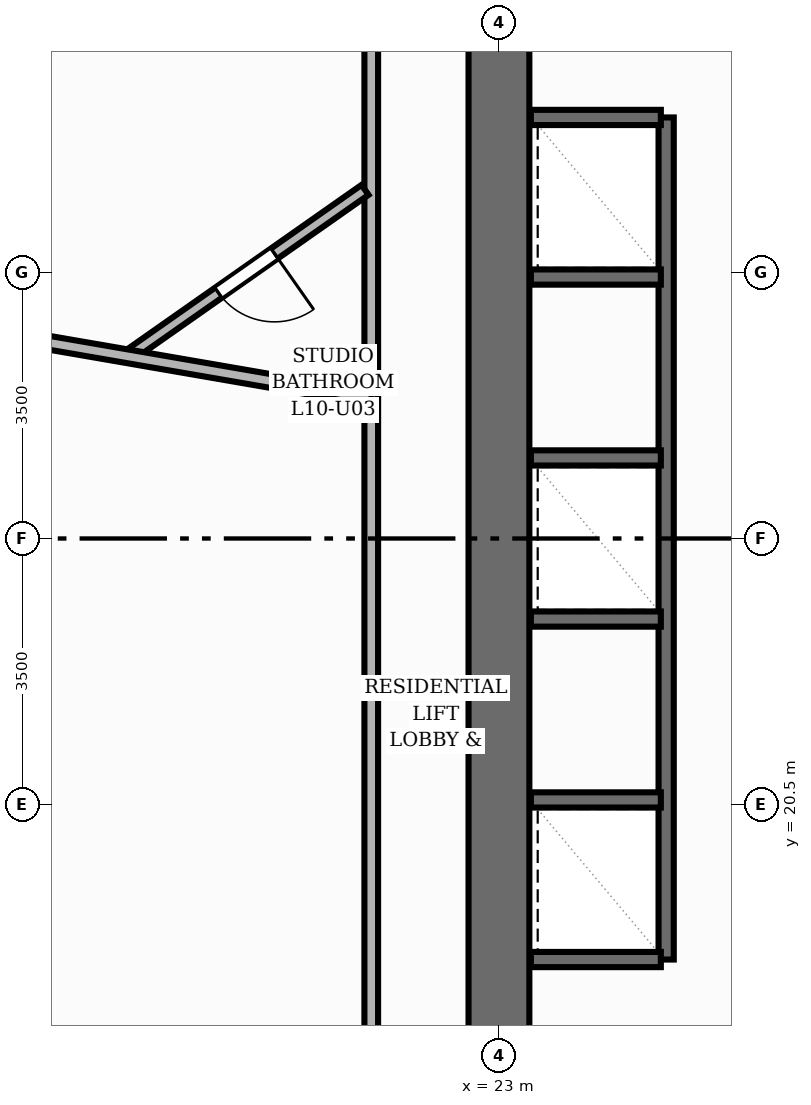
"""IFC4 building model, lengths in metres.
Left out: names, types, materials, properties, quantities, classifications, styles, units other than length and angle.
Written with IfcOpenShell. Run it as: python <this file> out.ifc"""

import sys

from ifc_helpers import new_model, si_unit, direction, frame, frame_2d, origin, place, context, subcontext, project, spatial, rectangle, extrude, element, fill, save


model = new_model("IFC4")
c1 = context("Model", 3, precision=1e-05, world=origin(), true_north=direction((0.0, 1.0)))
c2 = subcontext(c1, "Body", "Model", "MODEL_VIEW")
j1 = project(units=[si_unit("LENGTHUNIT", "METRE"), si_unit("PLANEANGLEUNIT", "RADIAN")], contexts=[c1])
p1 = place(None, origin())
s1 = spatial("IfcSite", under=j1, at=p1, CompositionType="ELEMENT")
p2 = place(p1, origin())
s2 = spatial("IfcBuilding", under=s1, at=p2, CompositionType="ELEMENT")
p3 = place(p2, frame((0.0, 0.0, 37.6)))
s3 = spatial("IfcBuildingStorey", under=s2, at=p3, CompositionType="ELEMENT", Elevation=37.6)
p4 = place(p3, frame((23.0, 17.4, 0.0), z_axis=(0.0, 0.0, 1.0), x_axis=(0.0, 1.0, 0.0)))
e1 = element("IfcWall", 1, at=p4, inside=s3, PredefinedType="SHEAR", context=c2, shape_type="SweptSolid", body=[
    extrude(rectangle(XDim=13.2, YDim=0.8, at=frame_2d((6.6, 0.0))), origin(), (0.0, 0.0, 1.0), 3.2),
])
p5 = place(p3, frame((25.2, 18.46, 0.0), z_axis=(0.0, 0.0, 1.0), x_axis=(0.0, 1.0, 0.0)))
e2 = element("IfcWall", 2, at=p5, inside=s3, PredefinedType="SHEAR", context=c2, shape_type="SweptSolid", body=[
    extrude(rectangle(XDim=11.08, YDim=0.2, at=frame_2d((5.54, 0.0))), origin(), (0.0, 0.0, 1.0), 3.2),
])
for number, where, z_axis, x_axis in (
    (3, (23.42, 18.46, 0.0), (0.0, 0.0, 1.0), (1.0, 0.0, 0.0)),
    (4, (23.42, 29.54, 0.0), (0.0, 0.0, 1.0), (1.0, 0.0, 0.0)),
    (5, (23.42, 20.56, 0.0), (0.0, 0.0, 1.0), (1.0, 0.0, 0.0)),
    (6, (23.42, 22.94, 0.0), (0.0, 0.0, 1.0), (1.0, 0.0, 0.0)),
    (7, (23.42, 25.06, 0.0), (0.0, 0.0, 1.0), (1.0, 0.0, 0.0)),
    (8, (23.42, 27.44, 0.0), (0.0, 0.0, 1.0), (1.0, 0.0, 0.0)),
):
    element("IfcWall", number, at=place(p3, frame(where, z_axis=z_axis, x_axis=x_axis)), inside=s3, PredefinedType="SHEAR", context=c2, shape_type="SweptSolid", body=[
        extrude(rectangle(XDim=1.71, YDim=0.2, at=frame_2d((0.855, 0.0))), origin(), (0.0, 0.0, 1.0), 3.2),
    ])
p6 = place(p3, frame((21.32, 15.32, 0.0), z_axis=(0.0, 0.0, 1.0), x_axis=(0.0, 1.0, 0.0)))
e9 = element("IfcWall", 9, at=p6, inside=s3, PredefinedType="PARTITIONING", context=c2, shape_type="SweptSolid", body=[
    extrude(rectangle(XDim=17.36, YDim=0.18, at=frame_2d((8.68, 0.0))), origin(), (0.0, 0.0, 1.0), 2.955),
])
p7 = place(p3, frame((21.238, 28.587, 0.0), z_axis=(0.0, 0.0, 1.0), x_axis=(-0.818554579869, -0.57442875953, 0.0)))
e10 = element("IfcWall", 10, at=p7, inside=s3, PredefinedType="PLUMBINGWALL", context=c2, shape_type="SweptSolid", body=[
    extrude(rectangle(XDim=3.813, YDim=0.16, at=frame_2d((1.907, 0.0))), origin(), (0.0, 0.0, 1.0), 2.955),
])
p8 = place(p7, frame((1.457, 0.0, 0.0)))
e11 = element("IfcOpeningElement", 11, at=p8, cuts=e10, PredefinedType="OPENING", context=c2, shape_type="SweptSolid", body=[
    extrude(rectangle(XDim=0.9, YDim=2.1, at=frame_2d((0.45, 1.05))), frame((0.0, 0.09, 0.0), z_axis=(0.0, -1.0, 0.0), x_axis=(1.0, 0.0, 0.0)), (0.0, 0.0, 1.0), 0.18),
])
p9 = place(p3, frame((21.32, 25.844, 0.0), z_axis=(0.0, 0.0, 1.0), x_axis=(-0.985428411656, 0.170090697865, 0.0)))
e12 = element("IfcWall", 12, at=p9, inside=s3, PredefinedType="PARTITIONING", context=c2, shape_type="SweptSolid", body=[
    extrude(rectangle(XDim=5.694, YDim=0.18, at=frame_2d((2.847, 0.0))), origin(), (0.0, 0.0, 1.0), 2.178),
])
p10 = place(p8, origin())
e13 = element("IfcDoor", 13, at=p10, inside=s3, OperationType="SINGLE_SWING_LEFT", PredefinedType="DOOR", context=c2, shape_type="SweptSolid", body=[
    extrude(rectangle(XDim=0.9, YDim=2.1, at=frame_2d((0.45, 1.05))), frame((0.0, 0.025, 0.0), z_axis=(0.0, -1.0, 0.0), x_axis=(1.0, 0.0, 0.0)), (0.0, 0.0, 1.0), 0.05),
])
fill(e11, e13)
save(model, sys.argv[1])
